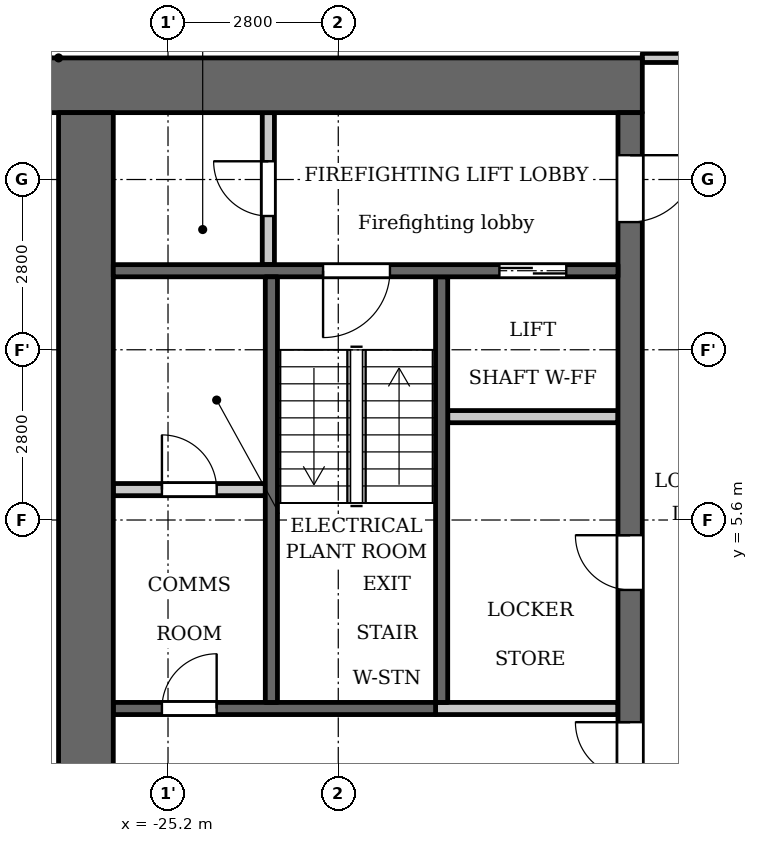
"""IFC4 building model, lengths in metres.
Left out: names, types, materials, properties, quantities, classifications, styles, units other than length and angle.
Written with IfcOpenShell. Run it as: python <this file> out.ifc"""

import sys

from ifc_helpers import new_model, si_unit, direction, frame, frame_2d, origin, place, context, subcontext, project, spatial, rectangle, extrude, element, fill, save


model = new_model("IFC4")
c1 = context("Model", 3, precision=1e-05, world=origin(), true_north=direction((0.0, 1.0)))
c2 = subcontext(c1, "Body", "Model", "MODEL_VIEW")
j1 = project(units=[si_unit("LENGTHUNIT", "METRE"), si_unit("PLANEANGLEUNIT", "RADIAN")], contexts=[c1])
p1 = place(None, origin())
s1 = spatial("IfcSite", under=j1, at=p1, CompositionType="ELEMENT")
p2 = place(p1, origin())
s2 = spatial("IfcBuilding", under=s1, at=p2, CompositionType="ELEMENT")
p3 = place(p2, frame((0.0, 0.0, 97.3)))
s3 = spatial("IfcBuildingStorey", under=s2, at=p3, CompositionType="ELEMENT", Elevation=97.3)
p4 = place(p3, frame((-20.7, 2.6, 0.0), z_axis=(0.0, 0.0, 1.0), x_axis=(0.0, 1.0, 0.0)))
e1 = element("IfcWall", 1, at=p4, inside=s3, PredefinedType="SHEAR", context=c2, shape_type="SweptSolid", body=[
    extrude(rectangle(XDim=7.0, YDim=0.2, at=frame_2d((3.5, 0.0))), origin(), (0.0, 0.0, 1.0), 3.2),
])
p5 = place(p3, frame((-20.8, 2.5, 0.0), z_axis=(0.0, 0.0, 1.0), x_axis=(-1.0, 0.0, 0.0)))
e2 = element("IfcWall", 2, at=p5, inside=s3, PredefinedType="SHEAR", context=c2, shape_type="SweptSolid", body=[
    extrude(rectangle(XDim=5.3, YDim=0.2, at=frame_2d((2.65, 0.0))), origin(), (0.0, 0.0, 1.0), 3.2),
])
p6 = place(p5, frame((3.6, 0.0, 0.0)))
e3 = element("IfcOpeningElement", 3, at=p6, cuts=e2, PredefinedType="OPENING", context=c2, shape_type="SweptSolid", body=[
    extrude(rectangle(XDim=0.9, YDim=2.1, at=frame_2d((0.45, 1.05))), frame((0.0, 0.11, 0.0), z_axis=(0.0, -1.0, 0.0), x_axis=(1.0, 0.0, 0.0)), (0.0, 0.0, 1.0), 0.22),
])
p7 = place(p3, frame((-17.4, 12.75, 0.0), z_axis=(0.0, 0.0, 1.0), x_axis=(-1.0, 0.0, 0.0)))
e4 = element("IfcWall", 4, at=p7, inside=s3, PredefinedType="SHEAR", context=c2, shape_type="SweptSolid", body=[
    extrude(rectangle(XDim=10.4, YDim=0.9, at=frame_2d((5.2, 0.0))), origin(), (0.0, 0.0, 1.0), 3.2),
])
p8 = place(p3, frame((-17.6, -12.3, 0.0), z_axis=(0.0, 0.0, 1.0), x_axis=(0.0, 1.0, 0.0)))
e5 = element("IfcWall", 5, at=p8, inside=s3, PredefinedType="SHEAR", context=c2, shape_type="SweptSolid", body=[
    extrude(rectangle(XDim=24.6, YDim=0.4, at=frame_2d((12.3, 0.0))), origin(), (0.0, 0.0, 1.0), 3.2),
])
p9 = place(p8, frame((6.0, 0.0, 0.0)))
e6 = element("IfcOpeningElement", 6, at=p9, cuts=e5, PredefinedType="OPENING", context=c2, shape_type="SweptSolid", body=[
    extrude(rectangle(XDim=1.1, YDim=2.1, at=frame_2d((0.55, 1.05))), frame((0.0, 0.21, 0.0), z_axis=(0.0, -1.0, 0.0), x_axis=(1.0, 0.0, 0.0)), (0.0, 0.0, 1.0), 0.42),
])
p10 = place(p8, frame((8.4, 0.0, 0.0)))
e7 = element("IfcOpeningElement", 7, at=p10, cuts=e5, PredefinedType="OPENING", context=c2, shape_type="SweptSolid", body=[
    extrude(rectangle(XDim=1.1, YDim=2.1, at=frame_2d((0.55, 1.05))), frame((0.0, 0.21, 0.0), z_axis=(0.0, -1.0, 0.0), x_axis=(1.0, 0.0, 0.0)), (0.0, 0.0, 1.0), 0.42),
])
p11 = place(p8, frame((10.8, 0.0, 0.0)))
e8 = element("IfcOpeningElement", 8, at=p11, cuts=e5, PredefinedType="OPENING", context=c2, shape_type="SweptSolid", body=[
    extrude(rectangle(XDim=1.1, YDim=2.1, at=frame_2d((0.55, 1.05))), frame((0.0, 0.21, 0.0), z_axis=(0.0, -1.0, 0.0), x_axis=(1.0, 0.0, 0.0)), (0.0, 0.0, 1.0), 0.42),
])
p12 = place(p8, frame((16.75, 0.0, 0.0)))
e9 = element("IfcOpeningElement", 9, at=p12, cuts=e5, PredefinedType="OPENING", context=c2, shape_type="SweptSolid", body=[
    extrude(rectangle(XDim=0.9, YDim=2.1, at=frame_2d((0.45, 1.05))), frame((0.0, 0.21, 0.0), z_axis=(0.0, -1.0, 0.0), x_axis=(1.0, 0.0, 0.0)), (0.0, 0.0, 1.0), 0.42),
])
p13 = place(p8, frame((22.8, 0.0, 0.0)))
e10 = element("IfcOpeningElement", 10, at=p13, cuts=e5, PredefinedType="OPENING", context=c2, shape_type="SweptSolid", body=[
    extrude(rectangle(XDim=1.1, YDim=2.1, at=frame_2d((0.55, 1.05))), frame((0.0, 0.21, 0.0), z_axis=(0.0, -1.0, 0.0), x_axis=(1.0, 0.0, 0.0)), (0.0, 0.0, 1.0), 0.42),
])
p14 = place(p8, frame((0.7, 0.0, 0.0)))
e11 = element("IfcOpeningElement", 11, at=p14, cuts=e5, PredefinedType="OPENING", context=c2, shape_type="SweptSolid", body=[
    extrude(rectangle(XDim=1.1, YDim=2.1, at=frame_2d((0.55, 1.05))), frame((0.0, 0.21, 0.0), z_axis=(0.0, -1.0, 0.0), x_axis=(1.0, 0.0, 0.0)), (0.0, 0.0, 1.0), 0.42),
])
p15 = place(p8, frame((12.775, 0.0, 0.0)))
e12 = element("IfcOpeningElement", 12, at=p15, cuts=e5, PredefinedType="OPENING", context=c2, shape_type="SweptSolid", body=[
    extrude(rectangle(XDim=1.8, YDim=2.1, at=frame_2d((0.9, 1.05))), frame((0.0, 0.21, 0.0), z_axis=(0.0, -1.0, 0.0), x_axis=(1.0, 0.0, 0.0)), (0.0, 0.0, 1.0), 0.42),
])
p16 = place(p3, frame((-26.55, -12.3, 0.0), z_axis=(0.0, 0.0, 1.0), x_axis=(0.0, 1.0, 0.0)))
e13 = element("IfcWall", 13, at=p16, inside=s3, PredefinedType="SHEAR", context=c2, shape_type="SweptSolid", body=[
    extrude(rectangle(XDim=24.6, YDim=0.9, at=frame_2d((12.3, 0.0))), origin(), (0.0, 0.0, 1.0), 3.2),
])
p17 = place(p3, frame((-23.55, 9.8, 0.0), z_axis=(0.0, 0.0, 1.0), x_axis=(0.0, 1.0, 0.0)))
e14 = element("IfcWall", 14, at=p17, inside=s3, PredefinedType="PARTITIONING", context=c2, shape_type="SweptSolid", body=[
    extrude(rectangle(XDim=2.5, YDim=0.2, at=frame_2d((1.25, 0.0))), origin(), (0.0, 0.0, 1.0), 3.2),
])
p18 = place(p17, frame((0.8, 0.0, 0.0)))
e15 = element("IfcOpeningElement", 15, at=p18, cuts=e14, PredefinedType="OPENING", context=c2, shape_type="SweptSolid", body=[
    extrude(rectangle(XDim=0.9, YDim=2.1, at=frame_2d((0.45, 1.05))), frame((0.0, 0.11, 0.0), z_axis=(0.0, -1.0, 0.0), x_axis=(1.0, 0.0, 0.0)), (0.0, 0.0, 1.0), 0.22),
])
p19 = place(p3, frame((-23.6, 6.1, 0.0), z_axis=(0.0, 0.0, 1.0), x_axis=(-1.0, 0.0, 0.0)))
e16 = element("IfcWall", 16, at=p19, inside=s3, PredefinedType="PARTITIONING", context=c2, shape_type="SweptSolid", body=[
    extrude(rectangle(XDim=2.5, YDim=0.2, at=frame_2d((1.25, 0.0))), origin(), (0.0, 0.0, 1.0), 3.2),
])
p20 = place(p19, frame((0.8, 0.0, 0.0)))
e17 = element("IfcOpeningElement", 17, at=p20, cuts=e16, PredefinedType="OPENING", context=c2, shape_type="SweptSolid", body=[
    extrude(rectangle(XDim=0.9, YDim=2.1, at=frame_2d((0.45, 1.05))), frame((0.0, 0.11, 0.0), z_axis=(0.0, -1.0, 0.0), x_axis=(1.0, 0.0, 0.0)), (0.0, 0.0, 1.0), 0.22),
])
p21 = place(p3, frame((-17.8, 2.5, 0.0), z_axis=(0.0, 0.0, 1.0), x_axis=(-1.0, 0.0, 0.0)))
e18 = element("IfcWall", 18, at=p21, inside=s3, PredefinedType="PARTITIONING", context=c2, shape_type="SweptSolid", body=[
    extrude(rectangle(XDim=3.0, YDim=0.2, at=frame_2d((1.5, 0.0))), origin(), (0.0, 0.0, 1.0), 3.2),
])
p22 = place(p3, frame((-17.8, 7.3, 0.0), z_axis=(0.0, 0.0, 1.0), x_axis=(-1.0, 0.0, 0.0)))
e19 = element("IfcWall", 19, at=p22, inside=s3, PredefinedType="PARTITIONING", context=c2, shape_type="SweptSolid", body=[
    extrude(rectangle(XDim=2.8, YDim=0.2, at=frame_2d((1.4, 0.0))), origin(), (0.0, 0.0, 1.0), 3.2),
])
p23 = place(p3, frame((-17.8, 9.7, 0.0), z_axis=(0.0, 0.0, 1.0), x_axis=(-1.0, 0.0, 0.0)))
e20 = element("IfcWall", 20, at=p23, inside=s3, PredefinedType="SHEAR", context=c2, shape_type="SweptSolid", body=[
    extrude(rectangle(XDim=8.3, YDim=0.2, at=frame_2d((4.15, 0.0))), origin(), (0.0, 0.0, 1.0), 3.2),
])
p24 = place(p23, frame((0.85, 0.0, 0.0)))
e21 = element("IfcOpeningElement", 21, at=p24, cuts=e20, PredefinedType="OPENING", context=c2, shape_type="SweptSolid", body=[
    extrude(rectangle(XDim=1.1, YDim=2.1, at=frame_2d((0.55, 1.05))), frame((0.0, 0.11, 0.0), z_axis=(0.0, -1.0, 0.0), x_axis=(1.0, 0.0, 0.0)), (0.0, 0.0, 1.0), 0.22),
])
p25 = place(p23, frame((3.75, 0.0, 0.0)))
e22 = element("IfcOpeningElement", 22, at=p25, cuts=e20, PredefinedType="OPENING", context=c2, shape_type="SweptSolid", body=[
    extrude(rectangle(XDim=1.1, YDim=2.1, at=frame_2d((0.55, 1.05))), frame((0.0, 0.11, 0.0), z_axis=(0.0, -1.0, 0.0), x_axis=(1.0, 0.0, 0.0)), (0.0, 0.0, 1.0), 0.22),
])
p26 = place(p3, frame((-23.5, 2.6, 0.0), z_axis=(0.0, 0.0, 1.0), x_axis=(0.0, 1.0, 0.0)))
e23 = element("IfcWall", 23, at=p26, inside=s3, PredefinedType="SHEAR", context=c2, shape_type="SweptSolid", body=[
    extrude(rectangle(XDim=7.0, YDim=0.2, at=frame_2d((3.5, 0.0))), origin(), (0.0, 0.0, 1.0), 3.2),
])
p27 = place(p3, frame((-17.4, 13.2, 0.0), z_axis=(0.0, 0.0, 1.0), x_axis=(1.0, 0.0, 0.0)))
e24 = element("IfcWall", 24, at=p27, inside=s3, PredefinedType="PARTITIONING", context=c2, shape_type="SweptSolid", body=[
    extrude(rectangle(XDim=34.8, YDim=0.15, at=frame_2d((17.4, 0.0))), origin(), (0.0, 0.0, 1.0), 3.2),
])
p28 = place(p27, frame((0.75, 0.0, 0.0)))
e25 = element("IfcOpeningElement", 25, at=p28, cuts=e24, PredefinedType="OPENING", context=c2, shape_type="SweptSolid", body=[
    extrude(rectangle(XDim=1.0, YDim=2.1, at=frame_2d((0.5, 1.05))), frame((0.0, 0.085, 0.0), z_axis=(0.0, -1.0, 0.0), x_axis=(1.0, 0.0, 0.0)), (0.0, 0.0, 1.0), 0.17),
])
p29 = place(p27, frame((33.15, 0.0, 0.0)))
e26 = element("IfcOpeningElement", 26, at=p29, cuts=e24, PredefinedType="OPENING", context=c2, shape_type="SweptSolid", body=[
    extrude(rectangle(XDim=1.0, YDim=2.1, at=frame_2d((0.5, 1.05))), frame((0.0, 0.085, 0.0), z_axis=(0.0, -1.0, 0.0), x_axis=(1.0, 0.0, 0.0)), (0.0, 0.0, 1.0), 0.17),
])
p30 = place(p27, frame((6.85, 0.0, 0.0)))
e27 = element("IfcOpeningElement", 27, at=p30, cuts=e24, PredefinedType="OPENING", context=c2, shape_type="SweptSolid", body=[
    extrude(rectangle(XDim=1.0, YDim=2.1, at=frame_2d((0.5, 1.05))), frame((0.0, 0.085, 0.0), z_axis=(0.0, -1.0, 0.0), x_axis=(1.0, 0.0, 0.0)), (0.0, 0.0, 1.0), 0.17),
])
p31 = place(p27, frame((15.45, 0.0, 0.0)))
e28 = element("IfcOpeningElement", 28, at=p31, cuts=e24, PredefinedType="OPENING", context=c2, shape_type="SweptSolid", body=[
    extrude(rectangle(XDim=1.0, YDim=2.1, at=frame_2d((0.5, 1.05))), frame((0.0, 0.085, 0.0), z_axis=(0.0, -1.0, 0.0), x_axis=(1.0, 0.0, 0.0)), (0.0, 0.0, 1.0), 0.17),
])
p32 = place(p27, frame((21.4, 0.0, 0.0)))
e29 = element("IfcOpeningElement", 29, at=p32, cuts=e24, PredefinedType="OPENING", context=c2, shape_type="SweptSolid", body=[
    extrude(rectangle(XDim=1.0, YDim=2.1, at=frame_2d((0.5, 1.05))), frame((0.0, 0.085, 0.0), z_axis=(0.0, -1.0, 0.0), x_axis=(1.0, 0.0, 0.0)), (0.0, 0.0, 1.0), 0.17),
])
p33 = place(p27, frame((23.65, 0.0, 0.0)))
e30 = element("IfcOpeningElement", 30, at=p33, cuts=e24, PredefinedType="OPENING", context=c2, shape_type="SweptSolid", body=[
    extrude(rectangle(XDim=1.0, YDim=2.1, at=frame_2d((0.5, 1.05))), frame((0.0, 0.085, 0.0), z_axis=(0.0, -1.0, 0.0), x_axis=(1.0, 0.0, 0.0)), (0.0, 0.0, 1.0), 0.17),
])
p34 = place(p12, origin())
e31 = element("IfcDoor", 31, at=p34, inside=s3, OperationType="SINGLE_SWING_LEFT", PredefinedType="DOOR", context=c2, shape_type="SweptSolid", body=[
    extrude(rectangle(XDim=0.9, YDim=2.1, at=frame_2d((0.45, 1.05))), frame((0.0, 0.025, 0.0), z_axis=(0.0, -1.0, 0.0), x_axis=(1.0, 0.0, 0.0)), (0.0, 0.0, 1.0), 0.05),
])
fill(e9, e31)
p35 = place(p24, origin())
e32 = element("IfcDoor", 32, at=p35, inside=s3, OperationType="DOUBLE_DOOR_SLIDING", PredefinedType="DOOR", context=c2, shape_type="SweptSolid", body=[
    extrude(rectangle(XDim=1.1, YDim=2.1, at=frame_2d((0.55, 1.05))), frame((0.0, 0.025, 0.0), z_axis=(0.0, -1.0, 0.0), x_axis=(1.0, 0.0, 0.0)), (0.0, 0.0, 1.0), 0.05),
])
fill(e21, e32)
p36 = place(p13, origin())
e33 = element("IfcDoor", 33, at=p36, inside=s3, OperationType="SINGLE_SWING_RIGHT", PredefinedType="DOOR", context=c2, shape_type="SweptSolid", body=[
    extrude(rectangle(XDim=1.1, YDim=2.1, at=frame_2d((0.55, 1.05))), frame((0.0, 0.025, 0.0), z_axis=(0.0, -1.0, 0.0), x_axis=(1.0, 0.0, 0.0)), (0.0, 0.0, 1.0), 0.05),
])
fill(e10, e33)
p37 = place(p18, origin())
e34 = element("IfcDoor", 34, at=p37, inside=s3, OperationType="SINGLE_SWING_LEFT", PredefinedType="DOOR", context=c2, shape_type="SweptSolid", body=[
    extrude(rectangle(XDim=0.9, YDim=2.1, at=frame_2d((0.45, 1.05))), frame((0.0, 0.025, 0.0), z_axis=(0.0, -1.0, 0.0), x_axis=(1.0, 0.0, 0.0)), (0.0, 0.0, 1.0), 0.05),
])
fill(e15, e34)
p38 = place(p25, origin())
e35 = element("IfcDoor", 35, at=p38, inside=s3, OperationType="SINGLE_SWING_LEFT", PredefinedType="DOOR", context=c2, shape_type="SweptSolid", body=[
    extrude(rectangle(XDim=1.1, YDim=2.1, at=frame_2d((0.55, 1.05))), frame((0.0, 0.025, 0.0), z_axis=(0.0, -1.0, 0.0), x_axis=(1.0, 0.0, 0.0)), (0.0, 0.0, 1.0), 0.05),
])
fill(e22, e35)
p39 = place(p15, origin())
e36 = element("IfcDoor", 36, at=p39, inside=s3, OperationType="DOUBLE_DOOR_SINGLE_SWING", PredefinedType="DOOR", context=c2, shape_type="SweptSolid", body=[
    extrude(rectangle(XDim=1.8, YDim=2.1, at=frame_2d((0.9, 1.05))), frame((0.0, 0.025, 0.0), z_axis=(0.0, -1.0, 0.0), x_axis=(1.0, 0.0, 0.0)), (0.0, 0.0, 1.0), 0.05),
])
fill(e12, e36)
p40 = place(p20, origin())
e37 = element("IfcDoor", 37, at=p40, inside=s3, OperationType="SINGLE_SWING_RIGHT", PredefinedType="DOOR", context=c2, shape_type="SweptSolid", body=[
    extrude(rectangle(XDim=0.9, YDim=2.1, at=frame_2d((0.45, 1.05))), frame((0.0, 0.025, 0.0), z_axis=(0.0, -1.0, 0.0), x_axis=(1.0, 0.0, 0.0)), (0.0, 0.0, 1.0), 0.05),
])
fill(e17, e37)
p41 = place(p6, origin())
e38 = element("IfcDoor", 38, at=p41, inside=s3, OperationType="SINGLE_SWING_LEFT", PredefinedType="DOOR", context=c2, shape_type="SweptSolid", body=[
    extrude(rectangle(XDim=0.9, YDim=2.1, at=frame_2d((0.45, 1.05))), frame((0.0, 0.025, 0.0), z_axis=(0.0, -1.0, 0.0), x_axis=(1.0, 0.0, 0.0)), (0.0, 0.0, 1.0), 0.05),
])
fill(e3, e38)
save(model, sys.argv[1])
